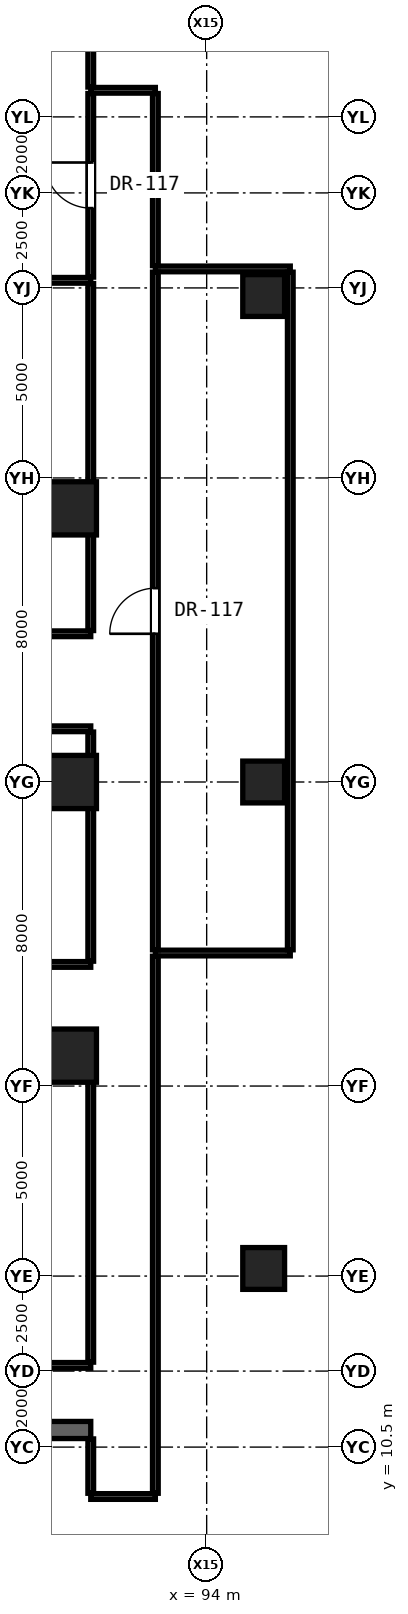
"""IFC4 building model, lengths in metres.
Left out: names, types, materials, properties, quantities, classifications, styles, units other than length and angle.
Written with IfcOpenShell. Run it as: python <this file> out.ifc"""

import sys

from ifc_helpers import new_model, si_unit, direction, frame, frame_2d, origin, origin_2d, place, context, subcontext, project, spatial, rectangle, hollow_rectangle, extrude, element, fill, save


model = new_model("IFC4")
c1 = context("Model", 3, precision=1e-05, world=origin(), true_north=direction((0.0, 1.0)))
c2 = subcontext(c1, "Body", "Model", "MODEL_VIEW")
j1 = project(units=[si_unit("LENGTHUNIT", "METRE"), si_unit("PLANEANGLEUNIT", "RADIAN")], contexts=[c1])
p1 = place(None, origin())
s1 = spatial("IfcSite", under=j1, at=p1, CompositionType="ELEMENT")
p2 = place(p1, origin())
s2 = spatial("IfcBuilding", under=s1, at=p2, CompositionType="ELEMENT")
p3 = place(p2, frame((0.0, 0.0, 5.2)))
s3 = spatial("IfcBuildingStorey", under=s2, at=p3, CompositionType="ELEMENT", Elevation=5.2)
for number, where, z_axis, x_axis in (
    (1, (90.4, 20.8, 0.0), (0.0, 0.0, 1.0), (1.0, 0.0, 0.0)),
    (2, (90.4, 28.0, 0.0), (0.0, 0.0, 1.0), (1.0, 0.0, 0.0)),
    (3, (90.4, 35.2, 0.0), (0.0, 0.0, 1.0), (1.0, 0.0, 0.0)),
):
    element("IfcColumn", number, at=place(p3, frame(where, z_axis=z_axis, x_axis=x_axis)), inside=s3, PredefinedType="COLUMN", context=c2, shape_type="SweptSolid", body=[
        extrude(hollow_rectangle(XDim=1.4, YDim=1.4, WallThickness=0.08, at=origin_2d()), origin(), (0.0, 0.0, 1.0), 4.3),
    ])
for number, where, z_axis, x_axis in (
    (4, (95.5, 15.2, 0.0), (0.0, 0.0, 1.0), (1.0, 0.0, 0.0)),
    (5, (95.5, 28.0, 0.0), (0.0, 0.0, 1.0), (1.0, 0.0, 0.0)),
    (6, (95.5, 40.8, 0.0), (0.0, 0.0, 1.0), (1.0, 0.0, 0.0)),
):
    element("IfcColumn", number, at=place(p3, frame(where, z_axis=z_axis, x_axis=x_axis)), inside=s3, PredefinedType="COLUMN", context=c2, shape_type="SweptSolid", body=[
        extrude(rectangle(XDim=1.1, YDim=1.1, at=origin_2d()), origin(), (0.0, 0.0, 1.0), 4.3),
    ])
p4 = place(p3, frame((90.95, 9.2, 0.0), z_axis=(0.0, 0.0, 1.0), x_axis=(1.0, 0.0, 0.0)))
e7 = element("IfcWall", 7, at=p4, inside=s3, PredefinedType="PARTITIONING", context=c2, shape_type="SweptSolid", body=[
    extrude(rectangle(XDim=1.7, YDim=0.15, at=frame_2d((0.85, 0.0))), origin(), (0.0, 0.0, 1.0), 3.98),
])
p5 = place(p3, frame((61.8, 10.95, 0.0), z_axis=(0.0, 0.0, 1.0), x_axis=(1.0, 0.0, 0.0)))
e8 = element("IfcWall", 8, at=p5, inside=s3, PredefinedType="SHEAR", context=c2, shape_type="SweptSolid", body=[
    extrude(rectangle(XDim=29.15, YDim=0.45, at=frame_2d((14.575, 0.0))), origin(), (0.0, 0.0, 1.0), 3.98),
])
p6 = place(p5, frame((7.57, 0.0, 0.0)))
e9 = element("IfcOpeningElement", 9, at=p6, cuts=e8, PredefinedType="OPENING", context=c2, shape_type="SweptSolid", body=[
    extrude(rectangle(XDim=1.15, YDim=2.2, at=frame_2d((0.575, 1.1))), frame((0.0, 0.235, 0.0), z_axis=(0.0, -1.0, 0.0), x_axis=(1.0, 0.0, 0.0)), (0.0, 0.0, 1.0), 0.47),
])
p7 = place(p5, frame((2.77, 0.0, 0.0)))
e10 = element("IfcOpeningElement", 10, at=p7, cuts=e8, PredefinedType="OPENING", context=c2, shape_type="SweptSolid", body=[
    extrude(rectangle(XDim=1.2, YDim=2.25, at=frame_2d((0.6, 1.125))), frame((0.0, 0.235, 0.0), z_axis=(0.0, -1.0, 0.0), x_axis=(1.0, 0.0, 0.0)), (0.0, 0.0, 1.0), 0.47),
])
p8 = place(p3, frame((61.8, 12.65, 0.0), z_axis=(0.0, 0.0, 1.0), x_axis=(1.0, 0.0, 0.0)))
e11 = element("IfcWall", 11, at=p8, inside=s3, PredefinedType="PARTITIONING", context=c2, shape_type="SweptSolid", body=[
    extrude(rectangle(XDim=29.15, YDim=0.15, at=frame_2d((14.575, 0.0))), origin(), (0.0, 0.0, 1.0), 3.116),
])
p9 = place(p3, frame((85.37, 20.8, 0.0), z_axis=(0.0, 0.0, 1.0), x_axis=(1.0, 0.0, 0.0)))
e12 = element("IfcWall", 12, at=p9, inside=s3, PredefinedType="PARTITIONING", context=c2, shape_type="SweptSolid", body=[
    extrude(rectangle(XDim=5.58, YDim=0.15, at=frame_2d((2.79, 0.0))), origin(), (0.0, 0.0, 1.0), 2.872),
])
p10 = place(p3, frame((61.8, 23.2, 0.0), z_axis=(0.0, 0.0, 1.0), x_axis=(1.0, 0.0, 0.0)))
e13 = element("IfcWall", 13, at=p10, inside=s3, PredefinedType="PARTITIONING", context=c2, shape_type="SweptSolid", body=[
    extrude(rectangle(XDim=29.15, YDim=0.15, at=frame_2d((14.575, 0.0))), origin(), (0.0, 0.0, 1.0), 3.045),
])
p11 = place(p10, frame((6.225, 0.0, 0.0)))
e14 = element("IfcOpeningElement", 14, at=p11, cuts=e13, PredefinedType="OPENING", context=c2, shape_type="SweptSolid", body=[
    extrude(rectangle(XDim=0.9, YDim=2.1, at=frame_2d((0.45, 1.05))), frame((0.0, 0.085, 0.0), z_axis=(0.0, -1.0, 0.0), x_axis=(1.0, 0.0, 0.0)), (0.0, 0.0, 1.0), 0.17),
])
p12 = place(p10, frame((15.075, 0.0, 0.0)))
e15 = element("IfcOpeningElement", 15, at=p12, cuts=e13, PredefinedType="OPENING", context=c2, shape_type="SweptSolid", body=[
    extrude(rectangle(XDim=1.2, YDim=2.25, at=frame_2d((0.6, 1.125))), frame((0.0, 0.085, 0.0), z_axis=(0.0, -1.0, 0.0), x_axis=(1.0, 0.0, 0.0)), (0.0, 0.0, 1.0), 0.17),
])
p13 = place(p3, frame((92.65, 23.5, 0.0), z_axis=(0.0, 0.0, 1.0), x_axis=(1.0, 0.0, 0.0)))
e16 = element("IfcWall", 16, at=p13, inside=s3, PredefinedType="PARTITIONING", context=c2, shape_type="SweptSolid", body=[
    extrude(rectangle(XDim=3.55, YDim=0.15, at=frame_2d((1.775, 0.0))), origin(), (0.0, 0.0, 1.0), 3.116),
])
p14 = place(p3, frame((85.22, 29.4, 0.0), z_axis=(0.0, 0.0, 1.0), x_axis=(1.0, 0.0, 0.0)))
e17 = element("IfcWall", 17, at=p14, inside=s3, PredefinedType="PARTITIONING", context=c2, shape_type="SweptSolid", body=[
    extrude(rectangle(XDim=5.73, YDim=0.15, at=frame_2d((2.865, 0.0))), origin(), (0.0, 0.0, 1.0), 3.116),
])
p15 = place(p3, frame((72.85, 31.9, 0.0), z_axis=(0.0, 0.0, 1.0), x_axis=(1.0, 0.0, 0.0)))
e18 = element("IfcWall", 18, at=p15, inside=s3, PredefinedType="PARTITIONING", context=c2, shape_type="SweptSolid", body=[
    extrude(rectangle(XDim=18.1, YDim=0.15, at=frame_2d((9.05, 0.0))), origin(), (0.0, 0.0, 1.0), 3.045),
])
p16 = place(p15, frame((9.21, 0.0, 0.0)))
e19 = element("IfcOpeningElement", 19, at=p16, cuts=e18, PredefinedType="OPENING", context=c2, shape_type="SweptSolid", body=[
    extrude(rectangle(XDim=1.2, YDim=2.25, at=frame_2d((0.6, 1.125))), frame((0.0, 0.085, 0.0), z_axis=(0.0, -1.0, 0.0), x_axis=(1.0, 0.0, 0.0)), (0.0, 0.0, 1.0), 0.17),
])
p17 = place(p15, frame((4.59, 0.0, 0.0)))
e20 = element("IfcOpeningElement", 20, at=p17, cuts=e18, PredefinedType="OPENING", context=c2, shape_type="SweptSolid", body=[
    extrude(rectangle(XDim=1.2, YDim=2.25, at=frame_2d((0.6, 1.125))), frame((0.0, 0.085, 0.0), z_axis=(0.0, -1.0, 0.0), x_axis=(1.0, 0.0, 0.0)), (0.0, 0.0, 1.0), 0.17),
])
p18 = place(p3, frame((85.02, 41.2, 0.0), z_axis=(0.0, 0.0, 1.0), x_axis=(1.0, 0.0, 0.0)))
e21 = element("IfcWall", 21, at=p18, inside=s3, PredefinedType="PARTITIONING", context=c2, shape_type="SweptSolid", body=[
    extrude(rectangle(XDim=5.93, YDim=0.15, at=frame_2d((2.965, 0.0))), origin(), (0.0, 0.0, 1.0), 3.116),
])
p19 = place(p3, frame((92.65, 41.5, 0.0), z_axis=(0.0, 0.0, 1.0), x_axis=(1.0, 0.0, 0.0)))
e22 = element("IfcWall", 22, at=p19, inside=s3, PredefinedType="PARTITIONING", context=c2, shape_type="SweptSolid", body=[
    extrude(rectangle(XDim=3.55, YDim=0.15, at=frame_2d((1.775, 0.0))), origin(), (0.0, 0.0, 1.0), 3.98),
])
p20 = place(p3, frame((90.95, 46.2, 0.0), z_axis=(0.0, 0.0, 1.0), x_axis=(1.0, 0.0, 0.0)))
e23 = element("IfcWall", 23, at=p20, inside=s3, PredefinedType="PARTITIONING", context=c2, shape_type="SweptSolid", body=[
    extrude(rectangle(XDim=1.7, YDim=0.15, at=frame_2d((0.85, 0.0))), origin(), (0.0, 0.0, 1.0), 3.98),
])
p21 = place(p3, frame((90.95, 9.285, 0.0), z_axis=(0.0, 0.0, 1.0), x_axis=(0.0, 1.0, 0.0)))
e24 = element("IfcWall", 24, at=p21, inside=s3, PredefinedType="PARTITIONING", context=c2, shape_type="SweptSolid", body=[
    extrude(rectangle(XDim=1.43, YDim=0.15, at=frame_2d((0.715, 0.0))), origin(), (0.0, 0.0, 1.0), 3.98),
])
p22 = place(p3, frame((90.95, 12.735, 0.0), z_axis=(0.0, 0.0, 1.0), x_axis=(0.0, 1.0, 0.0)))
e25 = element("IfcWall", 25, at=p22, inside=s3, PredefinedType="PARTITIONING", context=c2, shape_type="SweptSolid", body=[
    extrude(rectangle(XDim=7.98, YDim=0.15, at=frame_2d((3.99, 0.0))), origin(), (0.0, 0.0, 1.0), 3.116),
])
p23 = place(p3, frame((90.95, 23.285, 0.0), z_axis=(0.0, 0.0, 1.0), x_axis=(0.0, 1.0, 0.0)))
e26 = element("IfcWall", 26, at=p23, inside=s3, PredefinedType="PARTITIONING", context=c2, shape_type="SweptSolid", body=[
    extrude(rectangle(XDim=6.03, YDim=0.15, at=frame_2d((3.015, 0.0))), origin(), (0.0, 0.0, 1.0), 3.199),
])
p24 = place(p3, frame((90.95, 31.985, 0.0), z_axis=(0.0, 0.0, 1.0), x_axis=(0.0, 1.0, 0.0)))
e27 = element("IfcWall", 27, at=p24, inside=s3, PredefinedType="PARTITIONING", context=c2, shape_type="SweptSolid", body=[
    extrude(rectangle(XDim=9.13, YDim=0.15, at=frame_2d((4.565, 0.0))), origin(), (0.0, 0.0, 1.0), 3.116),
])
p25 = place(p3, frame((90.95, 41.285, 0.0), z_axis=(0.0, 0.0, 1.0), x_axis=(0.0, 1.0, 0.0)))
e28 = element("IfcWall", 28, at=p25, inside=s3, PredefinedType="PARTITIONING", context=c2, shape_type="SweptSolid", body=[
    extrude(rectangle(XDim=4.83, YDim=0.15, at=frame_2d((2.415, 0.0))), origin(), (0.0, 0.0, 1.0), 3.98),
])
p26 = place(p25, frame((1.815, 0.0, 0.0)))
e29 = element("IfcOpeningElement", 29, at=p26, cuts=e28, PredefinedType="OPENING", context=c2, shape_type="SweptSolid", body=[
    extrude(rectangle(XDim=1.2, YDim=2.25, at=frame_2d((0.6, 1.125))), frame((0.0, 0.085, 0.0), z_axis=(0.0, -1.0, 0.0), x_axis=(1.0, 0.0, 0.0)), (0.0, 0.0, 1.0), 0.17),
])
p27 = place(p3, frame((90.95, 46.285, 0.0), z_axis=(0.0, 0.0, 1.0), x_axis=(0.0, 1.0, 0.0)))
e30 = element("IfcWall", 30, at=p27, inside=s3, PredefinedType="PARTITIONING", context=c2, shape_type="SweptSolid", body=[
    extrude(rectangle(XDim=2.83, YDim=0.15, at=frame_2d((1.415, 0.0))), origin(), (0.0, 0.0, 1.0), 3.98),
])
p28 = place(p3, frame((92.65, 9.285, 0.0), z_axis=(0.0, 0.0, 1.0), x_axis=(0.0, 1.0, 0.0)))
e31 = element("IfcWall", 31, at=p28, inside=s3, PredefinedType="PARTITIONING", context=c2, shape_type="SweptSolid", body=[
    extrude(rectangle(XDim=14.13, YDim=0.15, at=frame_2d((7.065, 0.0))), origin(), (0.0, 0.0, 1.0), 3.116),
])
p29 = place(p3, frame((92.65, 23.585, 0.0), z_axis=(0.0, 0.0, 1.0), x_axis=(0.0, 1.0, 0.0)))
e32 = element("IfcWall", 32, at=p29, inside=s3, PredefinedType="PARTITIONING", context=c2, shape_type="SweptSolid", body=[
    extrude(rectangle(XDim=17.83, YDim=0.15, at=frame_2d((8.915, 0.0))), origin(), (0.0, 0.0, 1.0), 3.116),
])
p30 = place(p29, frame((8.315, 0.0, 0.0)))
e33 = element("IfcOpeningElement", 33, at=p30, cuts=e32, PredefinedType="OPENING", context=c2, shape_type="SweptSolid", body=[
    extrude(rectangle(XDim=1.2, YDim=2.25, at=frame_2d((0.6, 1.125))), frame((0.0, 0.085, 0.0), z_axis=(0.0, -1.0, 0.0), x_axis=(1.0, 0.0, 0.0)), (0.0, 0.0, 1.0), 0.17),
])
p31 = place(p3, frame((92.65, 41.585, 0.0), z_axis=(0.0, 0.0, 1.0), x_axis=(0.0, 1.0, 0.0)))
e34 = element("IfcWall", 34, at=p31, inside=s3, PredefinedType="PARTITIONING", context=c2, shape_type="SweptSolid", body=[
    extrude(rectangle(XDim=4.53, YDim=0.15, at=frame_2d((2.265, 0.0))), origin(), (0.0, 0.0, 1.0), 3.98),
])
p32 = place(p3, frame((96.2, 23.585, 0.0), z_axis=(0.0, 0.0, 1.0), x_axis=(0.0, 1.0, 0.0)))
e35 = element("IfcWall", 35, at=p32, inside=s3, PredefinedType="PARTITIONING", context=c2, shape_type="SweptSolid", body=[
    extrude(rectangle(XDim=17.83, YDim=0.15, at=frame_2d((8.915, 0.0))), origin(), (0.0, 0.0, 1.0), 3.98),
])
p33 = place(p30, origin())
e36 = element("IfcDoor", 36, at=p33, inside=s3, OperationType="SINGLE_SWING_LEFT", PredefinedType="DOOR", context=c2, shape_type="SweptSolid", body=[
    extrude(rectangle(XDim=1.2, YDim=2.25, at=frame_2d((0.6, 1.125))), frame((0.0, 0.025, 0.0), z_axis=(0.0, -1.0, 0.0), x_axis=(1.0, 0.0, 0.0)), (0.0, 0.0, 1.0), 0.05),
])
fill(e33, e36)
p34 = place(p26, origin())
e37 = element("IfcDoor", 37, at=p34, inside=s3, OperationType="SINGLE_SWING_RIGHT", PredefinedType="DOOR", context=c2, shape_type="SweptSolid", body=[
    extrude(rectangle(XDim=1.2, YDim=2.25, at=frame_2d((0.6, 1.125))), frame((0.0, 0.025, 0.0), z_axis=(0.0, -1.0, 0.0), x_axis=(1.0, 0.0, 0.0)), (0.0, 0.0, 1.0), 0.05),
])
fill(e29, e37)
save(model, sys.argv[1])
